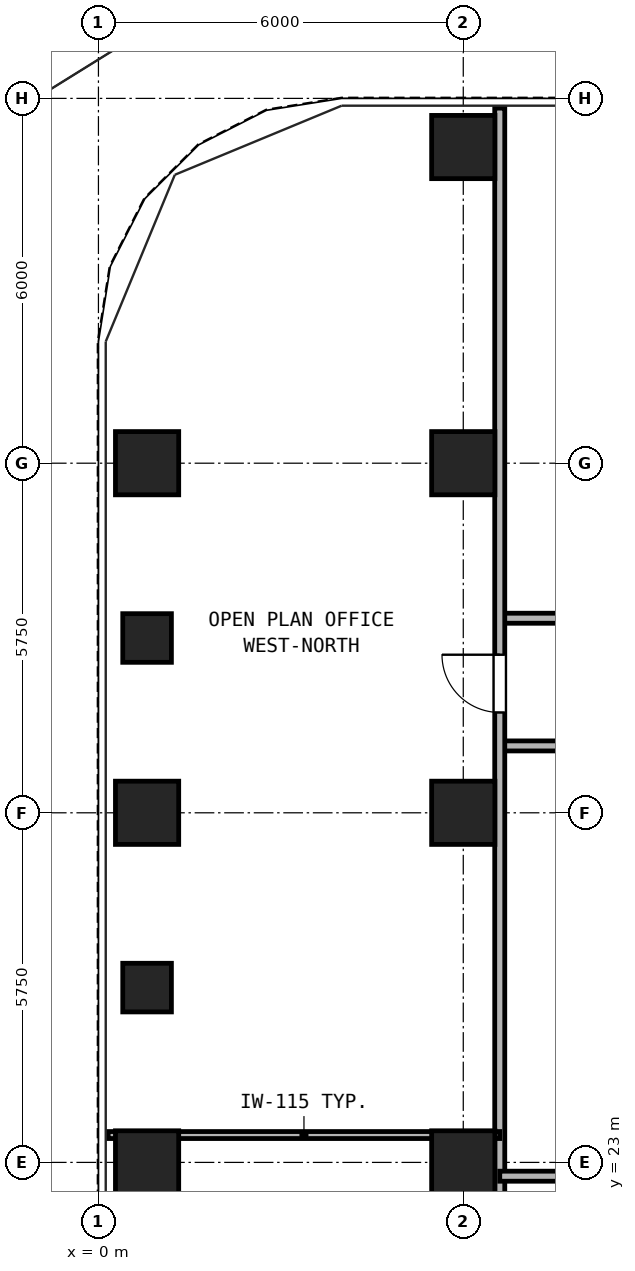
"""IFC4 building model, lengths in metres.
Left out: names, types, materials, properties, quantities, classifications, styles, units other than length and angle.
Written with IfcOpenShell. Run it as: python <this file> out.ifc"""

import sys

from ifc_helpers import new_model, si_unit, direction, frame, frame_2d, origin, origin_2d, place, context, subcontext, project, spatial, rectangle, hollow_rectangle, extrude, source, transform, mapped, element, fill, save


model = new_model("IFC4")
c1 = context("Model", 3, precision=1e-05, world=origin(), true_north=direction((0.0, 1.0)))
c2 = subcontext(c1, "Body", "Model", "MODEL_VIEW")
j1 = project(units=[si_unit("LENGTHUNIT", "METRE"), si_unit("PLANEANGLEUNIT", "RADIAN")], contexts=[c1])
p1 = place(None, origin())
s1 = spatial("IfcSite", under=j1, at=p1, CompositionType="ELEMENT")
p2 = place(p1, origin())
s2 = spatial("IfcBuilding", under=s1, at=p2, CompositionType="ELEMENT")
p3 = place(p2, frame((0.0, 0.0, 81.0)))
s3 = spatial("IfcBuildingStorey", under=s2, at=p3, CompositionType="ELEMENT", Elevation=81.0)
m1 = source(origin(), c2, "Body", "SweptSolid", [
    extrude(hollow_rectangle(XDim=1.04, YDim=1.04, WallThickness=0.065, at=origin_2d()), origin(), (0.0, 0.0, 1.0), 3.32),
])
for number, where, z_axis, x_axis in (
    (1, (6.0, 39.7, 0.0), (0.0, 0.0, 1.0), (1.0, 0.0, 0.0)),
    (2, (0.8, 23.0, 0.0), (0.0, 0.0, 1.0), (1.0, 0.0, 0.0)),
    (3, (0.8, 28.75, 0.0), (0.0, 0.0, 1.0), (1.0, 0.0, 0.0)),
    (4, (0.8, 34.5, 0.0), (0.0, 0.0, 1.0), (1.0, 0.0, 0.0)),
    (5, (6.0, 23.0, 0.0), (0.0, 0.0, 1.0), (1.0, 0.0, 0.0)),
    (6, (6.0, 28.75, 0.0), (0.0, 0.0, 1.0), (1.0, 0.0, 0.0)),
    (7, (6.0, 34.5, 0.0), (0.0, 0.0, 1.0), (1.0, 0.0, 0.0)),
):
    element("IfcColumn", number, at=place(p3, frame(where, z_axis=z_axis, x_axis=x_axis)), inside=s3, PredefinedType="COLUMN", context=c2, shape_type="MappedRepresentation", body=[
        mapped(m1, transform((0.0, 0.0, 0.0), x_axis=(1.0, 0.0, 0.0), y_axis=(0.0, 1.0, 0.0), z_axis=(0.0, 0.0, 1.0), scale=1.0)),
    ])
m2 = source(origin(), c2, "Body", "SweptSolid", [
    extrude(hollow_rectangle(XDim=0.8, YDim=0.8, WallThickness=0.045, at=origin_2d()), origin(), (0.0, 0.0, 1.0), 3.32),
])
for number, where, z_axis, x_axis in (
    (8, (0.8, 25.875, 0.0), (0.0, 0.0, 1.0), (1.0, 0.0, 0.0)),
    (9, (0.8, 31.625, 0.0), (0.0, 0.0, 1.0), (1.0, 0.0, 0.0)),
):
    element("IfcColumn", number, at=place(p3, frame(where, z_axis=z_axis, x_axis=x_axis)), inside=s3, PredefinedType="COLUMN", context=c2, shape_type="MappedRepresentation", body=[
        mapped(m2, transform((0.0, 0.0, 0.0), x_axis=(1.0, 0.0, 0.0), y_axis=(0.0, 1.0, 0.0), z_axis=(0.0, 0.0, 1.0), scale=1.0)),
    ])
p4 = place(p3, frame((6.6, 31.95, 0.0), z_axis=(0.0, 0.0, 1.0), x_axis=(1.0, 0.0, 0.0)))
e10 = element("IfcWall", 10, at=p4, inside=s3, PredefinedType="PARTITIONING", context=c2, shape_type="SweptSolid", body=[
    extrude(rectangle(XDim=33.8, YDim=0.165, at=frame_2d((16.9, 0.0))), origin(), (0.0, 0.0, 1.0), 3.32),
])
p5 = place(p4, frame((3.2, 0.0, 0.0)))
e11 = element("IfcOpeningElement", 11, at=p5, cuts=e10, PredefinedType="OPENING", context=c2, shape_type="SweptSolid", body=[
    extrude(rectangle(XDim=0.95, YDim=2.15, at=frame_2d((0.475, 1.075))), frame((0.0, 0.093, 0.0), z_axis=(0.0, -1.0, 0.0), x_axis=(1.0, 0.0, 0.0)), (0.0, 0.0, 1.0), 0.185),
])
p6 = place(p4, frame((10.65, 0.0, 0.0)))
e12 = element("IfcOpeningElement", 12, at=p6, cuts=e10, PredefinedType="OPENING", context=c2, shape_type="SweptSolid", body=[
    extrude(rectangle(XDim=0.95, YDim=2.15, at=frame_2d((0.475, 1.075))), frame((0.0, 0.093, 0.0), z_axis=(0.0, -1.0, 0.0), x_axis=(1.0, 0.0, 0.0)), (0.0, 0.0, 1.0), 0.185),
])
p7 = place(p4, frame((18.15, 0.0, 0.0)))
e13 = element("IfcOpeningElement", 13, at=p7, cuts=e10, PredefinedType="OPENING", context=c2, shape_type="SweptSolid", body=[
    extrude(rectangle(XDim=0.95, YDim=2.15, at=frame_2d((0.475, 1.075))), frame((0.0, 0.093, 0.0), z_axis=(0.0, -1.0, 0.0), x_axis=(1.0, 0.0, 0.0)), (0.0, 0.0, 1.0), 0.185),
])
p8 = place(p4, frame((25.15, 0.0, 0.0)))
e14 = element("IfcOpeningElement", 14, at=p8, cuts=e10, PredefinedType="OPENING", context=c2, shape_type="SweptSolid", body=[
    extrude(rectangle(XDim=0.95, YDim=2.15, at=frame_2d((0.475, 1.075))), frame((0.0, 0.093, 0.0), z_axis=(0.0, -1.0, 0.0), x_axis=(1.0, 0.0, 0.0)), (0.0, 0.0, 1.0), 0.185),
])
p9 = place(p4, frame((30.85, 0.0, 0.0)))
e15 = element("IfcOpeningElement", 15, at=p9, cuts=e10, PredefinedType="OPENING", context=c2, shape_type="SweptSolid", body=[
    extrude(rectangle(XDim=0.95, YDim=2.15, at=frame_2d((0.475, 1.075))), frame((0.0, 0.093, 0.0), z_axis=(0.0, -1.0, 0.0), x_axis=(1.0, 0.0, 0.0)), (0.0, 0.0, 1.0), 0.185),
])
p10 = place(p3, frame((6.6, 29.85, 0.0), z_axis=(0.0, 0.0, 1.0), x_axis=(1.0, 0.0, 0.0)))
e16 = element("IfcWall", 16, at=p10, inside=s3, PredefinedType="PARTITIONING", context=c2, shape_type="SweptSolid", body=[
    extrude(rectangle(XDim=9.7, YDim=0.165, at=frame_2d((4.85, 0.0))), origin(), (0.0, 0.0, 1.0), 3.32),
])
p11 = place(p3, frame((6.6, 0.16, 0.0), z_axis=(0.0, 0.0, 1.0), x_axis=(0.0, 1.0, 0.0)))
e17 = element("IfcWall", 17, at=p11, inside=s3, PredefinedType="PARTITIONING", context=c2, shape_type="SweptSolid", body=[
    extrude(rectangle(XDim=40.18, YDim=0.165, at=frame_2d((20.09, 0.0))), origin(), (0.0, 0.0, 1.0), 3.32),
])
p12 = place(p11, frame((8.19, 0.0, 0.0)))
e18 = element("IfcOpeningElement", 18, at=p12, cuts=e17, PredefinedType="OPENING", context=c2, shape_type="SweptSolid", body=[
    extrude(rectangle(XDim=0.95, YDim=2.15, at=frame_2d((0.475, 1.075))), frame((0.0, 0.093, 0.0), z_axis=(0.0, -1.0, 0.0), x_axis=(1.0, 0.0, 0.0)), (0.0, 0.0, 1.0), 0.185),
])
p13 = place(p11, frame((30.24, 0.0, 0.0)))
e19 = element("IfcOpeningElement", 19, at=p13, cuts=e17, PredefinedType="OPENING", context=c2, shape_type="SweptSolid", body=[
    extrude(rectangle(XDim=0.95, YDim=2.15, at=frame_2d((0.475, 1.075))), frame((0.0, 0.093, 0.0), z_axis=(0.0, -1.0, 0.0), x_axis=(1.0, 0.0, 0.0)), (0.0, 0.0, 1.0), 0.185),
])
p14 = place(p3, frame((0.16, 23.45, 0.0), z_axis=(0.0, 0.0, 1.0), x_axis=(1.0, 0.0, 0.0)))
e20 = element("IfcWall", 20, at=p14, inside=s3, PredefinedType="PARTITIONING", context=c2, shape_type="SweptSolid", body=[
    extrude(rectangle(XDim=6.44, YDim=0.115, at=frame_2d((3.22, 0.0))), origin(), (0.0, 0.0, 1.0), 3.32),
])
p15 = place(p3, frame((6.6, 22.773, 0.0), z_axis=(0.0, 0.0, 1.0), x_axis=(1.0, 0.0, 0.0)))
e21 = element("IfcWall", 21, at=p15, inside=s3, PredefinedType="PARTITIONING", context=c2, shape_type="SweptSolid", body=[
    extrude(rectangle(XDim=9.7, YDim=0.165, at=frame_2d((4.85, 0.0))), origin(), (0.0, 0.0, 1.0), 2.539),
])
p16 = place(p13, frame((0.95, 0.0, 0.0), z_axis=(0.0, 0.0, 1.0), x_axis=(-1.0, 0.0, 0.0)))
e22 = element("IfcDoor", 22, at=p16, inside=s3, OperationType="SINGLE_SWING_RIGHT", PredefinedType="DOOR", context=c2, shape_type="SweptSolid", body=[
    extrude(rectangle(XDim=0.95, YDim=2.15, at=frame_2d((0.475, 1.075))), frame((0.0, 0.025, 0.0), z_axis=(0.0, -1.0, 0.0), x_axis=(1.0, 0.0, 0.0)), (0.0, 0.0, 1.0), 0.05),
])
fill(e19, e22)
save(model, sys.argv[1])
